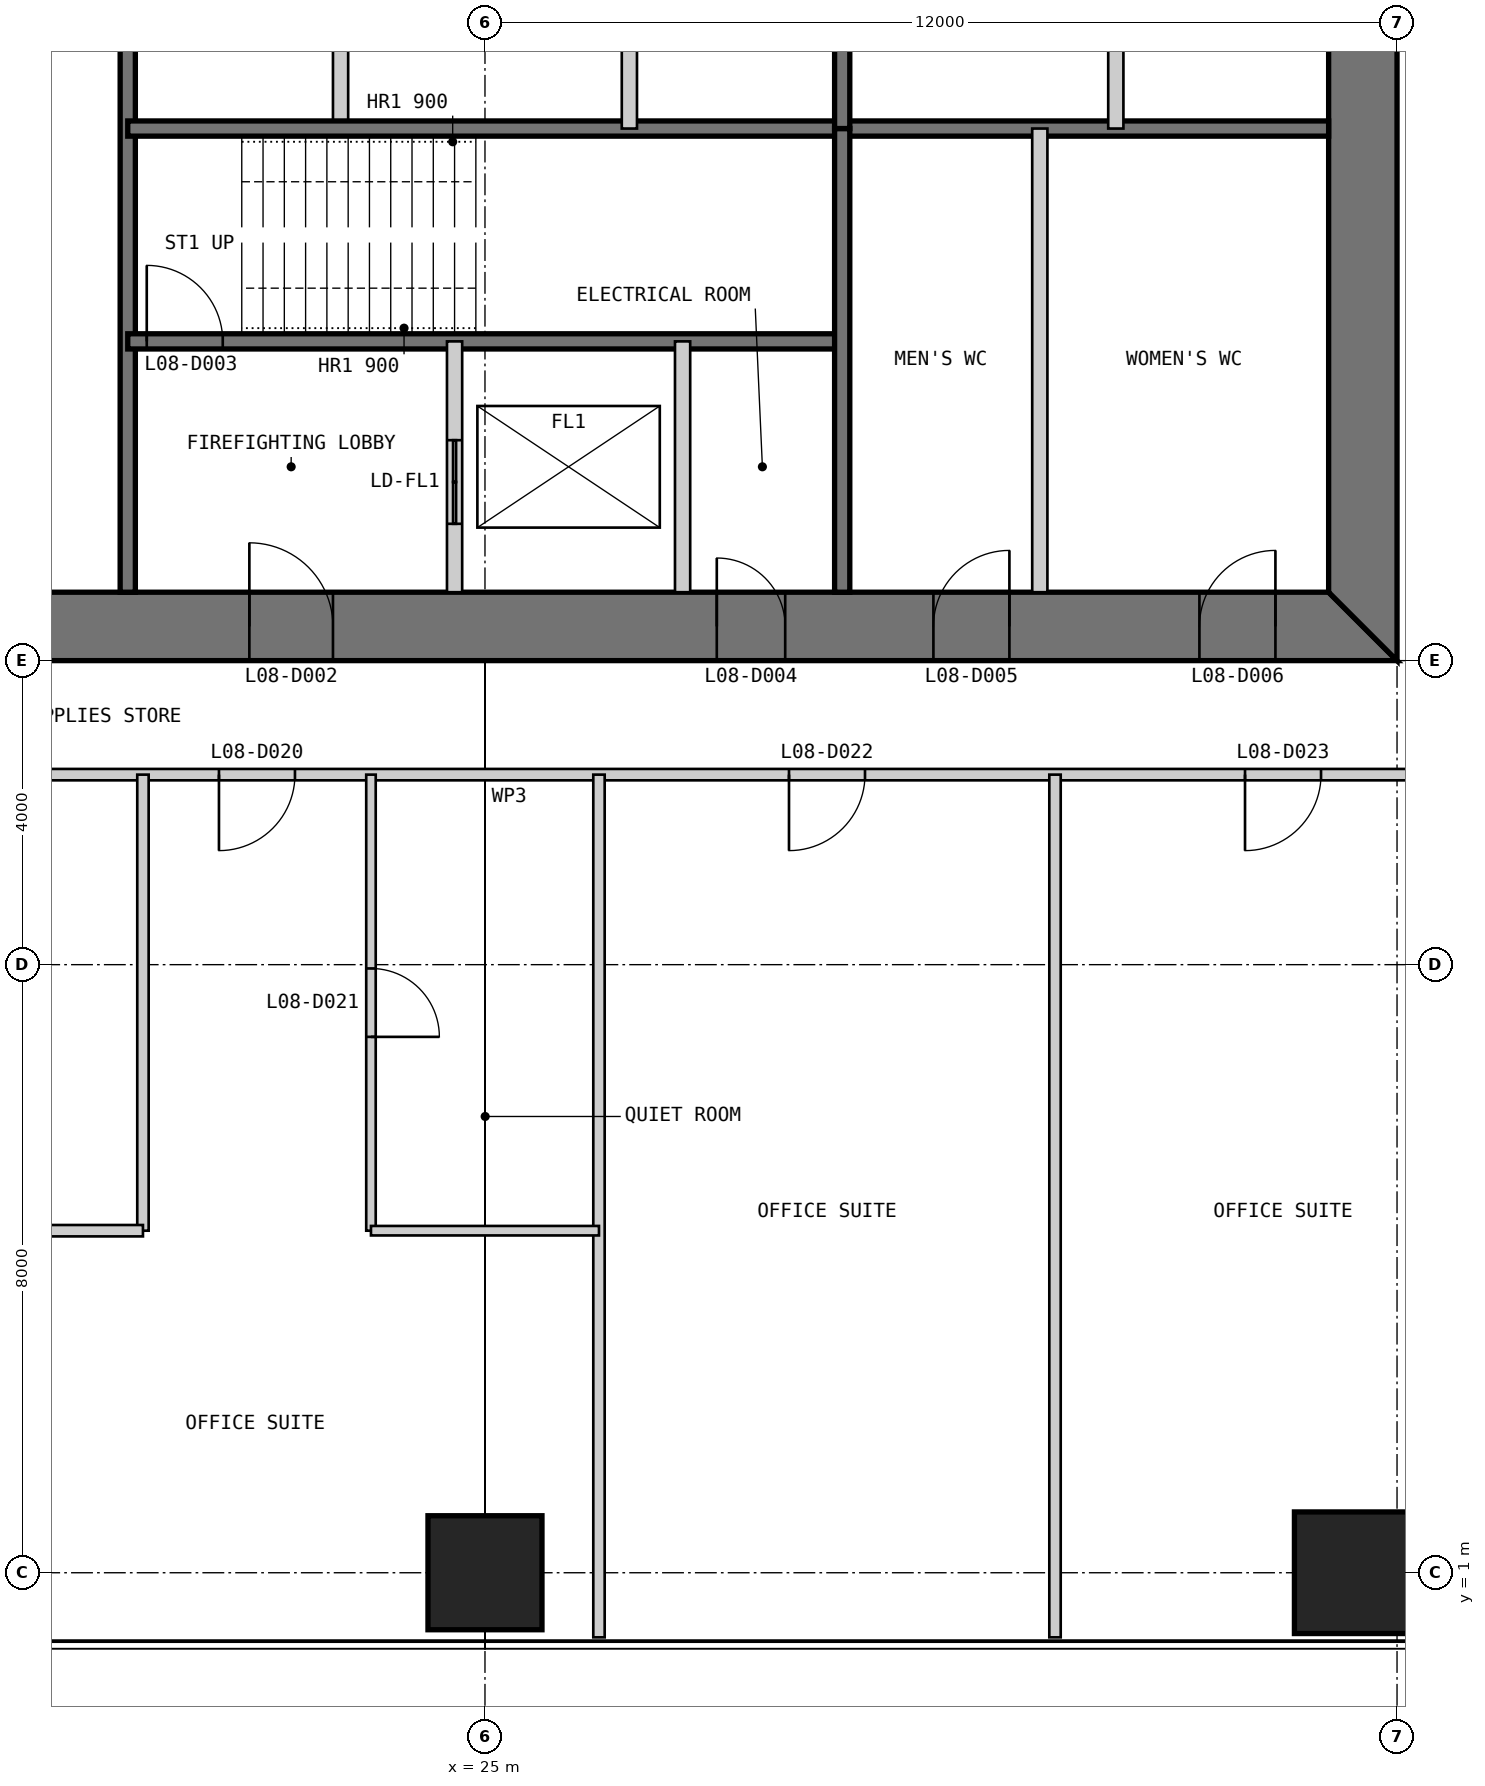
"""IFC4 building model, lengths in metres.
Left out: names, types, materials, properties, quantities, classifications, styles, units other than length and angle.
Written with IfcOpenShell. Run it as: python <this file> out.ifc"""

import sys

from ifc_helpers import new_model, si_unit, direction, frame, frame_2d, origin, origin_2d, place, context, subcontext, project, spatial, polyline, rectangle, outline, extrude, element, fill, save


model = new_model("IFC4")
c1 = context("Model", 3, precision=1e-05, world=origin(), true_north=direction((0.0, 1.0)))
c2 = subcontext(c1, "Body", "Model", "MODEL_VIEW")
j1 = project(units=[si_unit("LENGTHUNIT", "METRE"), si_unit("PLANEANGLEUNIT", "RADIAN")], contexts=[c1])
p1 = place(None, origin())
s1 = spatial("IfcSite", under=j1, at=p1, CompositionType="ELEMENT")
p2 = place(p1, origin())
s2 = spatial("IfcBuilding", under=s1, at=p2, CompositionType="ELEMENT")
p3 = place(p2, frame((0.0, 0.0, 39.0)))
s3 = spatial("IfcBuildingStorey", under=s2, at=p3, CompositionType="ELEMENT", Elevation=39.0)
p4 = place(p3, frame((25.0, 1.0, 0.0), z_axis=(0.0, 0.0, 1.0), x_axis=(1.0, 0.0, 0.0)))
e1 = element("IfcColumn", 1, at=p4, inside=s3, PredefinedType="COLUMN", context=c2, shape_type="SweptSolid", body=[
    extrude(rectangle(XDim=1.5, YDim=1.5, at=origin_2d()), origin(), (0.0, 0.0, 1.0), 4.0),
])
p5 = place(p3, frame((37.0, 1.0, 0.0), z_axis=(0.0, 0.0, 1.0), x_axis=(1.0, 0.0, 0.0)))
e2 = element("IfcColumn", 2, at=p5, inside=s3, PredefinedType="COLUMN", context=c2, shape_type="SweptSolid", body=[
    extrude(rectangle(XDim=2.7, YDim=1.6, at=origin_2d()), origin(), (0.0, 0.0, 1.0), 4.0),
])
p6 = place(p3, frame((13.0, 13.45, 0.0), z_axis=(0.0, 0.0, 1.0), x_axis=(1.0, 0.0, 0.0)))
e3 = element("IfcWall", 3, at=p6, inside=s3, PredefinedType="SHEAR", context=c2, shape_type="SweptSolid", body=[
    extrude(outline(polyline([(0.0, -0.45), (24.0, -0.45), (23.1, 0.45), (0.9, 0.45), (0.0, -0.45)])), origin(), (0.0, 0.0, 1.0), 4.0),
])
p7 = place(p6, frame((4.9, 0.0, 0.0)))
e4 = element("IfcOpeningElement", 4, at=p7, cuts=e3, PredefinedType="OPENING", context=c2, shape_type="SweptSolid", body=[
    extrude(rectangle(XDim=1.0, YDim=2.2, at=frame_2d((0.5, 1.1))), frame((0.0, 0.46, 0.0), z_axis=(0.0, -1.0, 0.0), x_axis=(1.0, 0.0, 0.0)), (0.0, 0.0, 1.0), 0.92),
])
p8 = place(p6, frame((8.9, 0.0, 0.0)))
e5 = element("IfcOpeningElement", 5, at=p8, cuts=e3, PredefinedType="OPENING", context=c2, shape_type="SweptSolid", body=[
    extrude(rectangle(XDim=1.1, YDim=2.2, at=frame_2d((0.55, 1.1))), frame((0.0, 0.46, 0.0), z_axis=(0.0, -1.0, 0.0), x_axis=(1.0, 0.0, 0.0)), (0.0, 0.0, 1.0), 0.92),
])
p9 = place(p6, frame((15.05, 0.0, 0.0)))
e6 = element("IfcOpeningElement", 6, at=p9, cuts=e3, PredefinedType="OPENING", context=c2, shape_type="SweptSolid", body=[
    extrude(rectangle(XDim=0.9, YDim=2.2, at=frame_2d((0.45, 1.1))), frame((0.0, 0.46, 0.0), z_axis=(0.0, -1.0, 0.0), x_axis=(1.0, 0.0, 0.0)), (0.0, 0.0, 1.0), 0.92),
])
p10 = place(p6, frame((17.9, 0.0, 0.0)))
e7 = element("IfcOpeningElement", 7, at=p10, cuts=e3, PredefinedType="OPENING", context=c2, shape_type="SweptSolid", body=[
    extrude(rectangle(XDim=1.0, YDim=2.2, at=frame_2d((0.5, 1.1))), frame((0.0, 0.46, 0.0), z_axis=(0.0, -1.0, 0.0), x_axis=(1.0, 0.0, 0.0)), (0.0, 0.0, 1.0), 0.92),
])
p11 = place(p6, frame((21.4, 0.0, 0.0)))
e8 = element("IfcOpeningElement", 8, at=p11, cuts=e3, PredefinedType="OPENING", context=c2, shape_type="SweptSolid", body=[
    extrude(rectangle(XDim=1.0, YDim=2.2, at=frame_2d((0.5, 1.1))), frame((0.0, 0.46, 0.0), z_axis=(0.0, -1.0, 0.0), x_axis=(1.0, 0.0, 0.0)), (0.0, 0.0, 1.0), 0.92),
])
p12 = place(p3, frame((36.55, 13.9, 0.0), z_axis=(0.0, 0.0, 1.0), x_axis=(0.0, 1.0, 0.0)))
e9 = element("IfcWall", 9, at=p12, inside=s3, PredefinedType="SHEAR", context=c2, shape_type="SweptSolid", body=[
    extrude(outline(polyline([(-0.9, -0.45), (23.1, -0.45), (22.2, 0.45), (0.0, 0.45), (-0.9, -0.45)])), origin(), (0.0, 0.0, 1.0), 4.0),
])
p13 = place(p12, frame((20.2, 0.0, 0.0)))
e10 = element("IfcOpeningElement", 10, at=p13, cuts=e9, PredefinedType="OPENING", context=c2, shape_type="SweptSolid", body=[
    extrude(rectangle(XDim=1.0, YDim=2.2, at=frame_2d((0.5, 1.1))), frame((0.0, 0.46, 0.0), z_axis=(0.0, -1.0, 0.0), x_axis=(1.0, 0.0, 0.0)), (0.0, 0.0, 1.0), 0.92),
])
p14 = place(p12, frame((17.25, 0.0, 0.0)))
e11 = element("IfcOpeningElement", 11, at=p14, cuts=e9, PredefinedType="OPENING", context=c2, shape_type="SweptSolid", body=[
    extrude(rectangle(XDim=0.9, YDim=2.2, at=frame_2d((0.45, 1.1))), frame((0.0, 0.46, 0.0), z_axis=(0.0, -1.0, 0.0), x_axis=(1.0, 0.0, 0.0)), (0.0, 0.0, 1.0), 0.92),
])
p15 = place(p3, frame((20.3, 13.9, 0.0), z_axis=(0.0, 0.0, 1.0), x_axis=(0.0, 1.0, 0.0)))
e12 = element("IfcWall", 12, at=p15, inside=s3, PredefinedType="SOLIDWALL", context=c2, shape_type="SweptSolid", body=[
    extrude(rectangle(XDim=16.1, YDim=0.2, at=frame_2d((8.05, 0.0))), origin(), (0.0, 0.0, 1.0), 3.8),
])
p16 = place(p3, frame((23.1, 20.0, 0.0), z_axis=(0.0, 0.0, 1.0), x_axis=(0.0, 1.0, 0.0)))
e13 = element("IfcWall", 13, at=p16, inside=s3, PredefinedType="PARTITIONING", context=c2, shape_type="SweptSolid", body=[
    extrude(rectangle(XDim=10.0, YDim=0.2, at=frame_2d((5.0, 0.0))), origin(), (0.0, 0.0, 1.0), 3.8),
])
p17 = place(p3, frame((20.3, 17.2, 0.0), z_axis=(0.0, 0.0, 1.0), x_axis=(1.0, 0.0, 0.0)))
e14 = element("IfcWall", 14, at=p17, inside=s3, PredefinedType="SOLIDWALL", context=c2, shape_type="SweptSolid", body=[
    extrude(rectangle(XDim=9.4, YDim=0.2, at=frame_2d((4.7, 0.0))), origin(), (0.0, 0.0, 1.0), 3.8),
])
p18 = place(p17, frame((0.25, 0.0, 0.0)))
e15 = element("IfcOpeningElement", 15, at=p18, cuts=e14, PredefinedType="OPENING", context=c2, shape_type="SweptSolid", body=[
    extrude(rectangle(XDim=1.0, YDim=2.2, at=frame_2d((0.5, 1.1))), frame((0.0, 0.11, 0.0), z_axis=(0.0, -1.0, 0.0), x_axis=(1.0, 0.0, 0.0)), (0.0, 0.0, 1.0), 0.22),
])
p19 = place(p3, frame((20.3, 20.0, 0.0), z_axis=(0.0, 0.0, 1.0), x_axis=(1.0, 0.0, 0.0)))
e16 = element("IfcWall", 16, at=p19, inside=s3, PredefinedType="SOLIDWALL", context=c2, shape_type="SweptSolid", body=[
    extrude(rectangle(XDim=15.8, YDim=0.2, at=frame_2d((7.9, 0.0))), origin(), (0.0, 0.0, 1.0), 3.8),
])
p20 = place(p3, frame((24.6, 13.9, 0.0), z_axis=(0.0, 0.0, 1.0), x_axis=(0.0, 1.0, 0.0)))
e17 = element("IfcWall", 17, at=p20, inside=s3, PredefinedType="PARTITIONING", context=c2, shape_type="SweptSolid", body=[
    extrude(rectangle(XDim=3.3, YDim=0.2, at=frame_2d((1.65, 0.0))), origin(), (0.0, 0.0, 1.0), 3.8),
])
p21 = place(p20, frame((0.9, 0.0, 0.0)))
e18 = element("IfcOpeningElement", 18, at=p21, cuts=e17, PredefinedType="OPENING", context=c2, shape_type="SweptSolid", body=[
    extrude(rectangle(XDim=1.1, YDim=2.2, at=frame_2d((0.55, 1.1))), frame((0.0, 0.11, 0.0), z_axis=(0.0, -1.0, 0.0), x_axis=(1.0, 0.0, 0.0)), (0.0, 0.0, 1.0), 0.22),
])
p22 = place(p3, frame((27.6, 13.9, 0.0), z_axis=(0.0, 0.0, 1.0), x_axis=(0.0, 1.0, 0.0)))
e19 = element("IfcWall", 19, at=p22, inside=s3, PredefinedType="PARTITIONING", context=c2, shape_type="SweptSolid", body=[
    extrude(rectangle(XDim=3.3, YDim=0.2, at=frame_2d((1.65, 0.0))), origin(), (0.0, 0.0, 1.0), 3.8),
])
p23 = place(p3, frame((29.7, 13.9, 0.0), z_axis=(0.0, 0.0, 1.0), x_axis=(0.0, 1.0, 0.0)))
e20 = element("IfcWall", 20, at=p23, inside=s3, PredefinedType="SOLIDWALL", context=c2, shape_type="SweptSolid", body=[
    extrude(rectangle(XDim=6.1, YDim=0.2, at=frame_2d((3.05, 0.0))), origin(), (0.0, 0.0, 1.0), 3.8),
])
p24 = place(p3, frame((32.3, 13.9, 0.0), z_axis=(0.0, 0.0, 1.0), x_axis=(0.0, 1.0, 0.0)))
e21 = element("IfcWall", 21, at=p24, inside=s3, PredefinedType="PARTITIONING", context=c2, shape_type="SweptSolid", body=[
    extrude(rectangle(XDim=6.1, YDim=0.2, at=frame_2d((3.05, 0.0))), origin(), (0.0, 0.0, 1.0), 3.8),
])
p25 = place(p3, frame((33.3, 36.1, 0.0), z_axis=(0.0, 0.0, 1.0), x_axis=(0.0, -1.0, 0.0)))
e22 = element("IfcWall", 22, at=p25, inside=s3, PredefinedType="PARTITIONING", context=c2, shape_type="SweptSolid", body=[
    extrude(rectangle(XDim=16.1, YDim=0.2, at=frame_2d((8.05, 0.0))), origin(), (0.0, 0.0, 1.0), 3.8),
])
p26 = place(p25, frame((3.8, 0.0, 0.0)))
e23 = element("IfcOpeningElement", 23, at=p26, cuts=e22, PredefinedType="OPENING", context=c2, shape_type="SweptSolid", body=[
    extrude(rectangle(XDim=0.9, YDim=2.2, at=frame_2d((0.45, 1.1))), frame((0.0, 0.11, 0.0), z_axis=(0.0, -1.0, 0.0), x_axis=(1.0, 0.0, 0.0)), (0.0, 0.0, 1.0), 0.22),
])
p27 = place(p3, frame((29.7, 36.1, 0.0), z_axis=(0.0, 0.0, 1.0), x_axis=(0.0, -1.0, 0.0)))
e24 = element("IfcWall", 24, at=p27, inside=s3, PredefinedType="SOLIDWALL", context=c2, shape_type="SweptSolid", body=[
    extrude(rectangle(XDim=16.1, YDim=0.2, at=frame_2d((8.05, 0.0))), origin(), (0.0, 0.0, 1.0), 3.8),
])
p28 = place(p3, frame((26.9, 30.0, 0.0), z_axis=(0.0, 0.0, 1.0), x_axis=(0.0, -1.0, 0.0)))
e25 = element("IfcWall", 25, at=p28, inside=s3, PredefinedType="PARTITIONING", context=c2, shape_type="SweptSolid", body=[
    extrude(rectangle(XDim=10.0, YDim=0.2, at=frame_2d((5.0, 0.0))), origin(), (0.0, 0.0, 1.0), 3.8),
])
p29 = place(p3, frame((11.5, 11.5, 0.0), z_axis=(0.0, 0.0, 1.0), x_axis=(1.0, 0.0, 0.0)))
e26 = element("IfcWall", 26, at=p29, inside=s3, PredefinedType="PARTITIONING", context=c2, shape_type="SweptSolid", body=[
    extrude(rectangle(XDim=27.0, YDim=0.15, at=frame_2d((13.5, 0.0))), origin(), (0.0, 0.0, 1.0), 3.85),
])
p30 = place(p29, frame((4.0, 0.0, 0.0)))
e27 = element("IfcOpeningElement", 27, at=p30, cuts=e26, PredefinedType="OPENING", context=c2, shape_type="SweptSolid", body=[
    extrude(rectangle(XDim=1.0, YDim=2.2, at=frame_2d((0.5, 1.1))), frame((0.0, 0.085, 0.0), z_axis=(0.0, -1.0, 0.0), x_axis=(1.0, 0.0, 0.0)), (0.0, 0.0, 1.0), 0.17),
])
p31 = place(p29, frame((10.0, 0.0, 0.0)))
e28 = element("IfcOpeningElement", 28, at=p31, cuts=e26, PredefinedType="OPENING", context=c2, shape_type="SweptSolid", body=[
    extrude(rectangle(XDim=1.0, YDim=2.2, at=frame_2d((0.5, 1.1))), frame((0.0, 0.085, 0.0), z_axis=(0.0, -1.0, 0.0), x_axis=(1.0, 0.0, 0.0)), (0.0, 0.0, 1.0), 0.17),
])
p32 = place(p29, frame((17.5, 0.0, 0.0)))
e29 = element("IfcOpeningElement", 29, at=p32, cuts=e26, PredefinedType="OPENING", context=c2, shape_type="SweptSolid", body=[
    extrude(rectangle(XDim=1.0, YDim=2.2, at=frame_2d((0.5, 1.1))), frame((0.0, 0.085, 0.0), z_axis=(0.0, -1.0, 0.0), x_axis=(1.0, 0.0, 0.0)), (0.0, 0.0, 1.0), 0.17),
])
p33 = place(p29, frame((23.5, 0.0, 0.0)))
e30 = element("IfcOpeningElement", 30, at=p33, cuts=e26, PredefinedType="OPENING", context=c2, shape_type="SweptSolid", body=[
    extrude(rectangle(XDim=1.0, YDim=2.2, at=frame_2d((0.5, 1.1))), frame((0.0, 0.085, 0.0), z_axis=(0.0, -1.0, 0.0), x_axis=(1.0, 0.0, 0.0)), (0.0, 0.0, 1.0), 0.17),
])
p34 = place(p3, frame((20.5, 5.5, 0.0), z_axis=(0.0, 0.0, 1.0), x_axis=(0.0, 1.0, 0.0)))
e31 = element("IfcWall", 31, at=p34, inside=s3, PredefinedType="PARTITIONING", context=c2, shape_type="SweptSolid", body=[
    extrude(rectangle(XDim=6.0, YDim=0.15, at=frame_2d((3.0, 0.0))), origin(), (0.0, 0.0, 1.0), 3.85),
])
p35 = place(p3, frame((23.5, 5.5, 0.0), z_axis=(0.0, 0.0, 1.0), x_axis=(0.0, 1.0, 0.0)))
e32 = element("IfcWall", 32, at=p35, inside=s3, PredefinedType="PARTITIONING", context=c2, shape_type="SweptSolid", body=[
    extrude(rectangle(XDim=6.0, YDim=0.125, at=frame_2d((3.0, 0.0))), origin(), (0.0, 0.0, 1.0), 3.85),
])
p36 = place(p35, frame((2.55, 0.0, 0.0)))
e33 = element("IfcOpeningElement", 33, at=p36, cuts=e32, PredefinedType="OPENING", context=c2, shape_type="SweptSolid", body=[
    extrude(rectangle(XDim=0.9, YDim=2.2, at=frame_2d((0.45, 1.1))), frame((0.0, 0.073, 0.0), z_axis=(0.0, -1.0, 0.0), x_axis=(1.0, 0.0, 0.0)), (0.0, 0.0, 1.0), 0.145),
])
for number, where, z_axis, x_axis in (
    (34, (26.5, 0.15, 0.0), (0.0, 0.0, 1.0), (0.0, 1.0, 0.0)),
    (35, (32.5, 0.15, 0.0), (0.0, 0.0, 1.0), (0.0, 1.0, 0.0)),
):
    element("IfcWall", number, at=place(p3, frame(where, z_axis=z_axis, x_axis=x_axis)), inside=s3, PredefinedType="PARTITIONING", context=c2, shape_type="SweptSolid", body=[
        extrude(rectangle(XDim=11.35, YDim=0.15, at=frame_2d((5.675, 0.0))), origin(), (0.0, 0.0, 1.0), 3.85),
    ])
p37 = place(p3, frame((14.5, 5.5, 0.0), z_axis=(0.0, 0.0, 1.0), x_axis=(1.0, 0.0, 0.0)))
e36 = element("IfcWall", 36, at=p37, inside=s3, PredefinedType="PARTITIONING", context=c2, shape_type="SweptSolid", body=[
    extrude(rectangle(XDim=6.0, YDim=0.15, at=frame_2d((3.0, 0.0))), origin(), (0.0, 0.0, 1.0), 3.85),
])
p38 = place(p3, frame((23.5, 5.5, 0.0), z_axis=(0.0, 0.0, 1.0), x_axis=(1.0, 0.0, 0.0)))
e37 = element("IfcWall", 37, at=p38, inside=s3, PredefinedType="PARTITIONING", context=c2, shape_type="SweptSolid", body=[
    extrude(rectangle(XDim=3.0, YDim=0.125, at=frame_2d((1.5, 0.0))), origin(), (0.0, 0.0, 1.0), 3.85),
])
p39 = place(p8, origin())
e38 = element("IfcDoor", 38, at=p39, inside=s3, OperationType="SINGLE_SWING_LEFT", PredefinedType="DOOR", context=c2, shape_type="SweptSolid", body=[
    extrude(rectangle(XDim=1.1, YDim=2.2, at=frame_2d((0.55, 1.1))), frame((0.0, 0.025, 0.0), z_axis=(0.0, -1.0, 0.0), x_axis=(1.0, 0.0, 0.0)), (0.0, 0.0, 1.0), 0.05),
    extrude(outline(polyline([(0.0, 0.0), (0.04, 0.0), (0.04, 2.16), (1.06, 2.16), (1.06, 0.0), (1.1, 0.0), (1.1, 2.2), (0.0, 2.2), (0.0, 0.0)])), frame((0.0, 0.3, 0.0), z_axis=(0.0, -1.0, 0.0), x_axis=(1.0, 0.0, 0.0)), (0.0, 0.0, 1.0), 0.6),
])
fill(e5, e38)
p40 = place(p18, origin())
e39 = element("IfcDoor", 39, at=p40, inside=s3, OperationType="SINGLE_SWING_LEFT", PredefinedType="DOOR", context=c2, shape_type="SweptSolid", body=[
    extrude(rectangle(XDim=1.0, YDim=2.2, at=frame_2d((0.5, 1.1))), frame((0.0, 0.025, 0.0), z_axis=(0.0, -1.0, 0.0), x_axis=(1.0, 0.0, 0.0)), (0.0, 0.0, 1.0), 0.05),
])
fill(e15, e39)
p41 = place(p9, origin())
e40 = element("IfcDoor", 40, at=p41, inside=s3, OperationType="SINGLE_SWING_LEFT", PredefinedType="DOOR", context=c2, shape_type="SweptSolid", body=[
    extrude(rectangle(XDim=0.9, YDim=2.2, at=frame_2d((0.45, 1.1))), frame((0.0, 0.025, 0.0), z_axis=(0.0, -1.0, 0.0), x_axis=(1.0, 0.0, 0.0)), (0.0, 0.0, 1.0), 0.05),
    extrude(outline(polyline([(0.0, 0.0), (0.04, 0.0), (0.04, 2.16), (0.86, 2.16), (0.86, 0.0), (0.9, 0.0), (0.9, 2.2), (0.0, 2.2), (0.0, 0.0)])), frame((0.0, 0.3, 0.0), z_axis=(0.0, -1.0, 0.0), x_axis=(1.0, 0.0, 0.0)), (0.0, 0.0, 1.0), 0.6),
])
fill(e6, e40)
p42 = place(p10, origin())
e41 = element("IfcDoor", 41, at=p42, inside=s3, OperationType="SINGLE_SWING_RIGHT", PredefinedType="DOOR", context=c2, shape_type="SweptSolid", body=[
    extrude(rectangle(XDim=1.0, YDim=2.2, at=frame_2d((0.5, 1.1))), frame((0.0, 0.025, 0.0), z_axis=(0.0, -1.0, 0.0), x_axis=(1.0, 0.0, 0.0)), (0.0, 0.0, 1.0), 0.05),
    extrude(outline(polyline([(0.0, 0.0), (0.04, 0.0), (0.04, 2.16), (0.96, 2.16), (0.96, 0.0), (1.0, 0.0), (1.0, 2.2), (0.0, 2.2), (0.0, 0.0)])), frame((0.0, 0.3, 0.0), z_axis=(0.0, -1.0, 0.0), x_axis=(1.0, 0.0, 0.0)), (0.0, 0.0, 1.0), 0.6),
])
fill(e7, e41)
p43 = place(p11, origin())
e42 = element("IfcDoor", 42, at=p43, inside=s3, OperationType="SINGLE_SWING_RIGHT", PredefinedType="DOOR", context=c2, shape_type="SweptSolid", body=[
    extrude(rectangle(XDim=1.0, YDim=2.2, at=frame_2d((0.5, 1.1))), frame((0.0, 0.025, 0.0), z_axis=(0.0, -1.0, 0.0), x_axis=(1.0, 0.0, 0.0)), (0.0, 0.0, 1.0), 0.05),
    extrude(outline(polyline([(0.0, 0.0), (0.04, 0.0), (0.04, 2.16), (0.96, 2.16), (0.96, 0.0), (1.0, 0.0), (1.0, 2.2), (0.0, 2.2), (0.0, 0.0)])), frame((0.0, 0.3, 0.0), z_axis=(0.0, -1.0, 0.0), x_axis=(1.0, 0.0, 0.0)), (0.0, 0.0, 1.0), 0.6),
])
fill(e8, e42)
p44 = place(p31, frame((1.0, 0.0, 0.0), z_axis=(0.0, 0.0, 1.0), x_axis=(-1.0, 0.0, 0.0)))
e43 = element("IfcDoor", 43, at=p44, inside=s3, OperationType="SINGLE_SWING_RIGHT", PredefinedType="DOOR", context=c2, shape_type="SweptSolid", body=[
    extrude(rectangle(XDim=1.0, YDim=2.2, at=frame_2d((0.5, 1.1))), frame((0.0, 0.025, 0.0), z_axis=(0.0, -1.0, 0.0), x_axis=(1.0, 0.0, 0.0)), (0.0, 0.0, 1.0), 0.05),
])
fill(e28, e43)
p45 = place(p36, frame((0.9, 0.0, 0.0), z_axis=(0.0, 0.0, 1.0), x_axis=(-1.0, 0.0, 0.0)))
e44 = element("IfcDoor", 44, at=p45, inside=s3, OperationType="SINGLE_SWING_RIGHT", PredefinedType="DOOR", context=c2, shape_type="SweptSolid", body=[
    extrude(rectangle(XDim=0.9, YDim=2.2, at=frame_2d((0.45, 1.1))), frame((0.0, 0.025, 0.0), z_axis=(0.0, -1.0, 0.0), x_axis=(1.0, 0.0, 0.0)), (0.0, 0.0, 1.0), 0.05),
])
fill(e33, e44)
p46 = place(p32, frame((1.0, 0.0, 0.0), z_axis=(0.0, 0.0, 1.0), x_axis=(-1.0, 0.0, 0.0)))
e45 = element("IfcDoor", 45, at=p46, inside=s3, OperationType="SINGLE_SWING_RIGHT", PredefinedType="DOOR", context=c2, shape_type="SweptSolid", body=[
    extrude(rectangle(XDim=1.0, YDim=2.2, at=frame_2d((0.5, 1.1))), frame((0.0, 0.025, 0.0), z_axis=(0.0, -1.0, 0.0), x_axis=(1.0, 0.0, 0.0)), (0.0, 0.0, 1.0), 0.05),
])
fill(e29, e45)
p47 = place(p33, frame((1.0, 0.0, 0.0), z_axis=(0.0, 0.0, 1.0), x_axis=(-1.0, 0.0, 0.0)))
e46 = element("IfcDoor", 46, at=p47, inside=s3, OperationType="SINGLE_SWING_RIGHT", PredefinedType="DOOR", context=c2, shape_type="SweptSolid", body=[
    extrude(rectangle(XDim=1.0, YDim=2.2, at=frame_2d((0.5, 1.1))), frame((0.0, 0.025, 0.0), z_axis=(0.0, -1.0, 0.0), x_axis=(1.0, 0.0, 0.0)), (0.0, 0.0, 1.0), 0.05),
])
fill(e30, e46)
p48 = place(p21, origin())
e47 = element("IfcDoor", 47, at=p48, inside=s3, OperationType="DOUBLE_DOOR_SLIDING", PredefinedType="DOOR", context=c2, shape_type="SweptSolid", body=[
    extrude(rectangle(XDim=1.1, YDim=2.2, at=frame_2d((0.55, 1.1))), frame((0.0, 0.025, 0.0), z_axis=(0.0, -1.0, 0.0), x_axis=(1.0, 0.0, 0.0)), (0.0, 0.0, 1.0), 0.05),
])
fill(e18, e47)
save(model, sys.argv[1])
